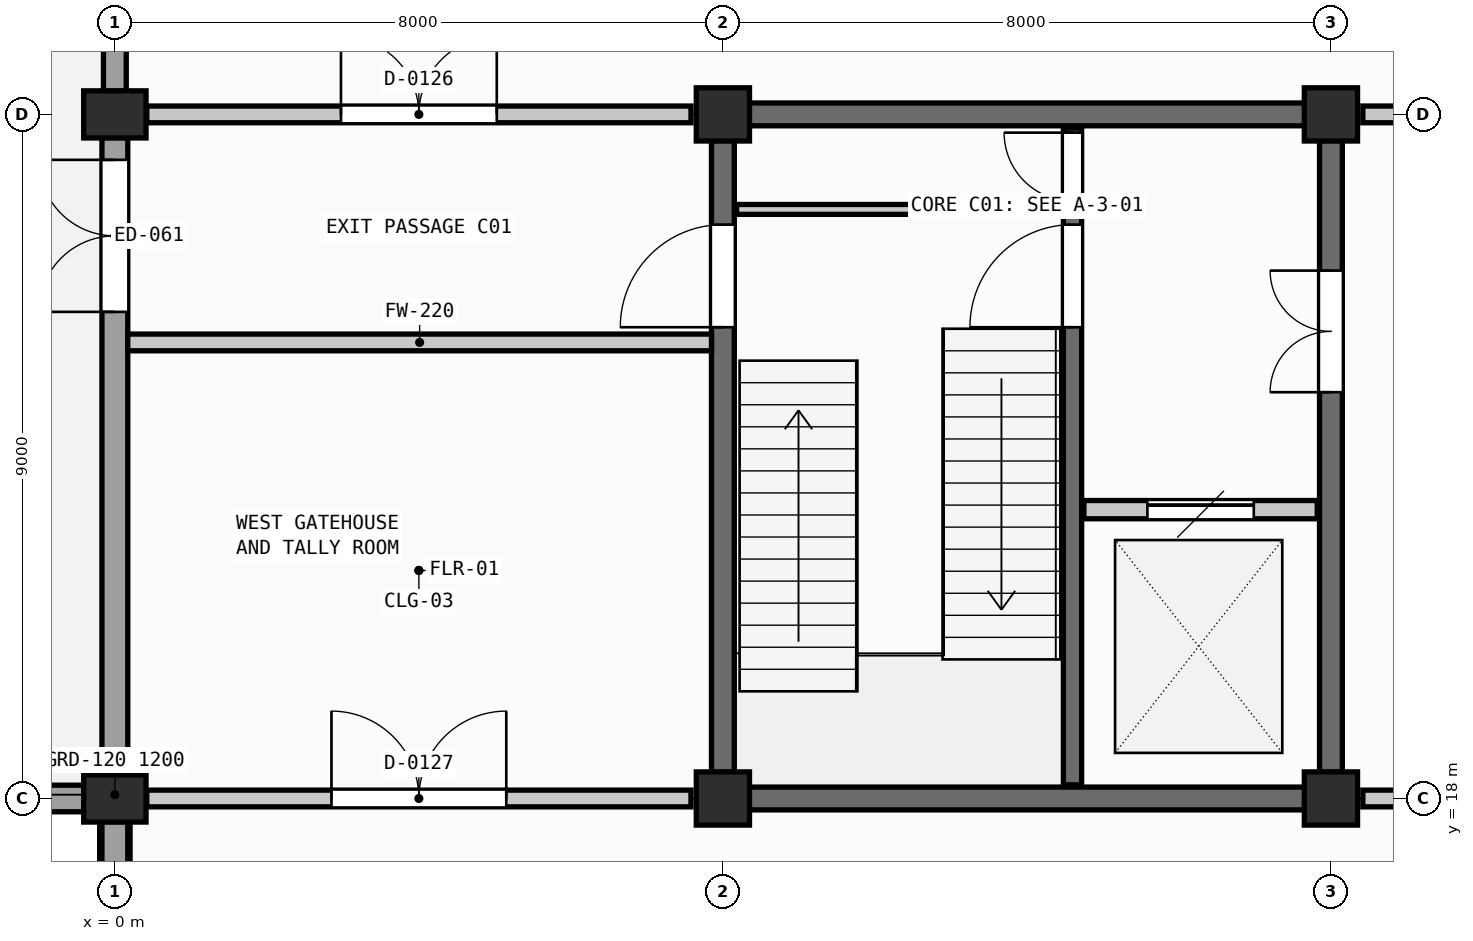
"""IFC4 building model, lengths in metres.
Left out: names, types, materials, properties, quantities, classifications, styles, units other than length and angle.
Written with IfcOpenShell. Run it as: python <this file> out.ifc"""

import sys

from ifc_helpers import new_model, si_unit, direction, frame, frame_2d, origin, origin_2d, place, context, subcontext, project, spatial, rectangle, extrude, element, fill, save


model = new_model("IFC4")
c1 = context("Model", 3, precision=1e-05, world=origin(), true_north=direction((0.0, 1.0)))
c2 = subcontext(c1, "Body", "Model", "MODEL_VIEW")
j1 = project(units=[si_unit("LENGTHUNIT", "METRE"), si_unit("PLANEANGLEUNIT", "RADIAN")], contexts=[c1])
p1 = place(None, origin())
s1 = spatial("IfcSite", under=j1, at=p1, CompositionType="ELEMENT")
p2 = place(p1, origin())
s2 = spatial("IfcBuilding", under=s1, at=p2, CompositionType="ELEMENT")
p3 = place(p2, origin())
s3 = spatial("IfcBuildingStorey", under=s2, at=p3, CompositionType="ELEMENT", Elevation=0.0)
p4 = place(p3, frame((0.0, 0.0, -1.25), z_axis=(0.0, 0.0, 1.0), x_axis=(0.0, 1.0, 0.0)))
e1 = element("IfcWall", 1, at=p4, inside=s3, PredefinedType="STANDARD", context=c2, shape_type="SweptSolid", body=[
    extrude(rectangle(XDim=18.0, YDim=0.4, at=frame_2d((9.0, 0.0))), origin(), (0.0, 0.0, 1.0), 0.9),
])
p5 = place(p3, frame((-3.2, 18.0, -1.25), z_axis=(0.0, 0.0, 1.0), x_axis=(1.0, 0.0, 0.0)))
e2 = element("IfcWall", 2, at=p5, inside=s3, PredefinedType="STANDARD", context=c2, shape_type="SweptSolid", body=[
    extrude(rectangle(XDim=3.2, YDim=0.35, at=frame_2d((1.6, 0.0))), origin(), (0.0, 0.0, 1.0), 0.97),
])
for number, where, z_axis, x_axis in (
    (3, (0.0, 18.0, -1.25), (0.0, 0.0, 1.0), (1.0, 0.0, 0.0)),
    (4, (0.0, 27.0, -1.25), (0.0, 0.0, 1.0), (1.0, 0.0, 0.0)),
):
    element("IfcColumn", number, at=place(p3, frame(where, z_axis=z_axis, x_axis=x_axis)), inside=s3, PredefinedType="COLUMN", context=c2, shape_type="SweptSolid", body=[
        extrude(rectangle(XDim=0.82, YDim=0.62, at=origin_2d()), origin(), (0.0, 0.0, 1.0), 6.05),
    ])
for number, where, z_axis, x_axis in (
    (5, (8.0, 18.0, -1.25), (0.0, 0.0, 1.0), (1.0, 0.0, 0.0)),
    (6, (8.0, 27.0, -1.25), (0.0, 0.0, 1.0), (1.0, 0.0, 0.0)),
    (7, (16.0, 18.0, -1.25), (0.0, 0.0, 1.0), (1.0, 0.0, 0.0)),
    (8, (16.0, 27.0, -1.25), (0.0, 0.0, 1.0), (1.0, 0.0, 0.0)),
):
    element("IfcColumn", number, at=place(p3, frame(where, z_axis=z_axis, x_axis=x_axis)), inside=s3, PredefinedType="COLUMN", context=c2, shape_type="SweptSolid", body=[
        extrude(rectangle(XDim=0.7, YDim=0.7, at=origin_2d()), origin(), (0.0, 0.0, 1.0), 6.05),
    ])
p6 = place(p3, frame((0.0, 17.695, 0.0), z_axis=(0.0, 0.0, 1.0), x_axis=(0.0, -1.0, 0.0)))
e9 = element("IfcWall", 9, at=p6, inside=s3, PredefinedType="SOLIDWALL", context=c2, shape_type="SweptSolid", body=[
    extrude(rectangle(XDim=8.39, YDim=0.34, at=frame_2d((4.195, 0.0))), origin(), (0.0, 0.0, 1.0), 3.65),
])
p7 = place(p3, frame((0.0, 26.695, 0.0), z_axis=(0.0, 0.0, 1.0), x_axis=(0.0, -1.0, 0.0)))
e10 = element("IfcWall", 10, at=p7, inside=s3, PredefinedType="SOLIDWALL", context=c2, shape_type="SweptSolid", body=[
    extrude(rectangle(XDim=8.39, YDim=0.34, at=frame_2d((4.195, 0.0))), origin(), (0.0, 0.0, 1.0), 3.65),
])
p8 = place(p7, frame((0.293, 0.0, 0.0)))
e11 = element("IfcOpeningElement", 11, at=p8, cuts=e10, PredefinedType="OPENING", context=c2, shape_type="SweptSolid", body=[
    extrude(rectangle(XDim=2.0, YDim=2.25, at=frame_2d((1.0, 1.125))), frame((0.0, 0.18, 0.0), z_axis=(0.0, -1.0, 0.0), x_axis=(1.0, 0.0, 0.0)), (0.0, 0.0, 1.0), 0.36),
])
p9 = place(p3, frame((0.0, 35.695, 0.0), z_axis=(0.0, 0.0, 1.0), x_axis=(0.0, -1.0, 0.0)))
e12 = element("IfcWall", 12, at=p9, inside=s3, PredefinedType="SOLIDWALL", context=c2, shape_type="SweptSolid", body=[
    extrude(rectangle(XDim=8.39, YDim=0.3, at=frame_2d((4.195, 0.0))), origin(), (0.0, 0.0, 1.0), 3.65),
])
p10 = place(p9, frame((2.995, 0.0, 0.0)))
e13 = element("IfcOpeningElement", 13, at=p10, cuts=e12, PredefinedType="OPENING", context=c2, shape_type="SweptSolid", body=[
    extrude(rectangle(XDim=2.4, YDim=2.3, at=frame_2d((1.2, 1.15))), frame((0.0, 0.16, 0.0), z_axis=(0.0, -1.0, 0.0), x_axis=(1.0, 0.0, 0.0)), (0.0, 0.0, 1.0), 0.32),
])
for number, where, z_axis, x_axis in (
    (14, (8.345, 18.0, -1.25), (0.0, 0.0, 1.0), (1.0, 0.0, 0.0)),
    (15, (8.345, 27.0, -1.25), (0.0, 0.0, 1.0), (1.0, 0.0, 0.0)),
):
    element("IfcWall", number, at=place(p3, frame(where, z_axis=z_axis, x_axis=x_axis)), inside=s3, PredefinedType="SHEAR", context=c2, shape_type="SweptSolid", body=[
        extrude(rectangle(XDim=7.31, YDim=0.3, at=frame_2d((3.655, 0.0))), origin(), (0.0, 0.0, 1.0), 5.755),
    ])
p11 = place(p3, frame((8.0, 18.345, -1.25), z_axis=(0.0, 0.0, 1.0), x_axis=(0.0, 1.0, 0.0)))
e16 = element("IfcWall", 16, at=p11, inside=s3, PredefinedType="SHEAR", context=c2, shape_type="SweptSolid", body=[
    extrude(rectangle(XDim=8.31, YDim=0.3, at=frame_2d((4.155, 0.0))), origin(), (0.0, 0.0, 1.0), 5.755),
])
p12 = place(p11, frame((5.855, 0.0, 1.25)))
e17 = element("IfcOpeningElement", 17, at=p12, cuts=e16, PredefinedType="OPENING", context=c2, shape_type="SweptSolid", body=[
    extrude(rectangle(XDim=1.35, YDim=2.2, at=frame_2d((0.675, 1.1))), frame((0.0, 0.16, 0.0), z_axis=(0.0, -1.0, 0.0), x_axis=(1.0, 0.0, 0.0)), (0.0, 0.0, 1.0), 0.32),
])
p13 = place(p3, frame((16.0, 18.345, -1.25), z_axis=(0.0, 0.0, 1.0), x_axis=(0.0, 1.0, 0.0)))
e18 = element("IfcWall", 18, at=p13, inside=s3, PredefinedType="SHEAR", context=c2, shape_type="SweptSolid", body=[
    extrude(rectangle(XDim=8.31, YDim=0.3, at=frame_2d((4.155, 0.0))), origin(), (0.0, 0.0, 1.0), 5.755),
])
p14 = place(p13, frame((5.0, 0.0, 1.25)))
e19 = element("IfcOpeningElement", 19, at=p14, cuts=e18, PredefinedType="OPENING", context=c2, shape_type="SweptSolid", body=[
    extrude(rectangle(XDim=1.6, YDim=2.2, at=frame_2d((0.8, 1.1))), frame((0.0, 0.16, 0.0), z_axis=(0.0, -1.0, 0.0), x_axis=(1.0, 0.0, 0.0)), (0.0, 0.0, 1.0), 0.32),
])
p15 = place(p3, frame((12.6, 18.18, -1.25), z_axis=(0.0, 0.0, 1.0), x_axis=(0.0, 1.0, 0.0)))
e20 = element("IfcWall", 20, at=p15, inside=s3, PredefinedType="SHEAR", context=c2, shape_type="SweptSolid", body=[
    extrude(rectangle(XDim=8.64, YDim=0.24, at=frame_2d((4.32, 0.0))), origin(), (0.0, 0.0, 1.0), 5.755),
])
p16 = place(p15, frame((6.02, 0.0, 1.25)))
e21 = element("IfcOpeningElement", 21, at=p16, cuts=e20, PredefinedType="OPENING", context=c2, shape_type="SweptSolid", body=[
    extrude(rectangle(XDim=1.35, YDim=2.2, at=frame_2d((0.675, 1.1))), frame((0.0, 0.13, 0.0), z_axis=(0.0, -1.0, 0.0), x_axis=(1.0, 0.0, 0.0)), (0.0, 0.0, 1.0), 0.26),
])
p17 = place(p15, frame((7.68, 0.0, 1.25)))
e22 = element("IfcOpeningElement", 22, at=p17, cuts=e20, PredefinedType="OPENING", context=c2, shape_type="SweptSolid", body=[
    extrude(rectangle(XDim=0.9, YDim=2.05, at=frame_2d((0.45, 1.025))), frame((0.0, 0.13, 0.0), z_axis=(0.0, -1.0, 0.0), x_axis=(1.0, 0.0, 0.0)), (0.0, 0.0, 1.0), 0.26),
])
p18 = place(p3, frame((8.18, 25.75, 0.0), z_axis=(0.0, 0.0, 1.0), x_axis=(1.0, 0.0, 0.0)))
e23 = element("IfcWall", 23, at=p18, inside=s3, PredefinedType="PARTITIONING", context=c2, shape_type="SweptSolid", body=[
    extrude(rectangle(XDim=4.28, YDim=0.13, at=frame_2d((2.14, 0.0))), origin(), (0.0, 0.0, 1.0), 3.855),
])
p19 = place(p3, frame((12.75, 21.8, 0.0), z_axis=(0.0, 0.0, 1.0), x_axis=(1.0, 0.0, 0.0)))
e24 = element("IfcWall", 24, at=p19, inside=s3, PredefinedType="SHEAR", context=c2, shape_type="SweptSolid", body=[
    extrude(rectangle(XDim=3.07, YDim=0.24, at=frame_2d((1.535, 0.0))), origin(), (0.0, 0.0, 1.0), 3.855),
])
p20 = place(p19, frame((0.835, 0.0, 0.0)))
e25 = element("IfcOpeningElement", 25, at=p20, cuts=e24, PredefinedType="OPENING", context=c2, shape_type="SweptSolid", body=[
    extrude(rectangle(XDim=1.4, YDim=2.3, at=frame_2d((0.7, 1.15))), frame((0.0, 0.13, 0.0), z_axis=(0.0, -1.0, 0.0), x_axis=(1.0, 0.0, 0.0)), (0.0, 0.0, 1.0), 0.26),
])
p21 = place(p3, frame((0.42, 27.0, 0.0), z_axis=(0.0, 0.0, 1.0), x_axis=(1.0, 0.0, 0.0)))
e26 = element("IfcWall", 26, at=p21, inside=s3, PredefinedType="SOLIDWALL", context=c2, shape_type="SweptSolid", body=[
    extrude(rectangle(XDim=7.16, YDim=0.22, at=frame_2d((3.58, 0.0))), origin(), (0.0, 0.0, 1.0), 3.55),
])
p22 = place(p21, frame((2.555, 0.0, 0.0)))
e27 = element("IfcOpeningElement", 27, at=p22, cuts=e26, PredefinedType="OPENING", context=c2, shape_type="SweptSolid", body=[
    extrude(rectangle(XDim=2.05, YDim=2.4, at=frame_2d((1.025, 1.2))), frame((0.0, 0.12, 0.0), z_axis=(0.0, -1.0, 0.0), x_axis=(1.0, 0.0, 0.0)), (0.0, 0.0, 1.0), 0.24),
])
p23 = place(p3, frame((0.42, 18.0, 0.0), z_axis=(0.0, 0.0, 1.0), x_axis=(1.0, 0.0, 0.0)))
e28 = element("IfcWall", 28, at=p23, inside=s3, PredefinedType="SOLIDWALL", context=c2, shape_type="SweptSolid", body=[
    extrude(rectangle(XDim=7.16, YDim=0.22, at=frame_2d((3.58, 0.0))), origin(), (0.0, 0.0, 1.0), 3.55),
])
p24 = place(p23, frame((2.43, 0.0, 0.0)))
e29 = element("IfcOpeningElement", 29, at=p24, cuts=e28, PredefinedType="OPENING", context=c2, shape_type="SweptSolid", body=[
    extrude(rectangle(XDim=2.3, YDim=2.5, at=frame_2d((1.15, 1.25))), frame((0.0, 0.12, 0.0), z_axis=(0.0, -1.0, 0.0), x_axis=(1.0, 0.0, 0.0)), (0.0, 0.0, 1.0), 0.24),
])
p25 = place(p3, frame((16.42, 27.0, 0.0), z_axis=(0.0, 0.0, 1.0), x_axis=(1.0, 0.0, 0.0)))
e30 = element("IfcWall", 30, at=p25, inside=s3, PredefinedType="SOLIDWALL", context=c2, shape_type="SweptSolid", body=[
    extrude(rectangle(XDim=7.16, YDim=0.22, at=frame_2d((3.58, 0.0))), origin(), (0.0, 0.0, 1.0), 3.55),
])
p26 = place(p25, frame((2.555, 0.0, 0.0)))
e31 = element("IfcOpeningElement", 31, at=p26, cuts=e30, PredefinedType="OPENING", context=c2, shape_type="SweptSolid", body=[
    extrude(rectangle(XDim=2.05, YDim=2.4, at=frame_2d((1.025, 1.2))), frame((0.0, 0.12, 0.0), z_axis=(0.0, -1.0, 0.0), x_axis=(1.0, 0.0, 0.0)), (0.0, 0.0, 1.0), 0.24),
])
p27 = place(p3, frame((16.42, 18.0, 0.0), z_axis=(0.0, 0.0, 1.0), x_axis=(1.0, 0.0, 0.0)))
e32 = element("IfcWall", 32, at=p27, inside=s3, PredefinedType="SOLIDWALL", context=c2, shape_type="SweptSolid", body=[
    extrude(rectangle(XDim=7.16, YDim=0.22, at=frame_2d((3.58, 0.0))), origin(), (0.0, 0.0, 1.0), 3.55),
])
p28 = place(p27, frame((2.43, 0.0, 0.0)))
e33 = element("IfcOpeningElement", 33, at=p28, cuts=e32, PredefinedType="OPENING", context=c2, shape_type="SweptSolid", body=[
    extrude(rectangle(XDim=2.3, YDim=2.5, at=frame_2d((1.15, 1.25))), frame((0.0, 0.12, 0.0), z_axis=(0.0, -1.0, 0.0), x_axis=(1.0, 0.0, 0.0)), (0.0, 0.0, 1.0), 0.24),
])
p29 = place(p3, frame((0.17, 24.0, 0.0), z_axis=(0.0, 0.0, 1.0), x_axis=(1.0, 0.0, 0.0)))
e34 = element("IfcWall", 34, at=p29, inside=s3, PredefinedType="SOLIDWALL", context=c2, shape_type="SweptSolid", body=[
    extrude(rectangle(XDim=7.68, YDim=0.22, at=frame_2d((3.84, 0.0))), origin(), (0.0, 0.0, 1.0), 3.65),
])
p30 = place(p16, origin())
e35 = element("IfcDoor", 35, at=p30, inside=s3, OperationType="SINGLE_SWING_LEFT", PredefinedType="DOOR", context=c2, shape_type="SweptSolid", body=[
    extrude(rectangle(XDim=1.35, YDim=2.2, at=frame_2d((0.675, 1.1))), frame((0.0, 0.025, 0.0), z_axis=(0.0, -1.0, 0.0), x_axis=(1.0, 0.0, 0.0)), (0.0, 0.0, 1.0), 0.05),
])
fill(e21, e35)
p31 = place(p17, origin())
e36 = element("IfcDoor", 36, at=p31, inside=s3, OperationType="SINGLE_SWING_RIGHT", PredefinedType="DOOR", context=c2, shape_type="SweptSolid", body=[
    extrude(rectangle(XDim=0.9, YDim=2.05, at=frame_2d((0.45, 1.025))), frame((0.0, 0.025, 0.0), z_axis=(0.0, -1.0, 0.0), x_axis=(1.0, 0.0, 0.0)), (0.0, 0.0, 1.0), 0.05),
])
fill(e22, e36)
p32 = place(p14, origin())
e37 = element("IfcDoor", 37, at=p32, inside=s3, OperationType="DOUBLE_DOOR_SINGLE_SWING", PredefinedType="DOOR", context=c2, shape_type="SweptSolid", body=[
    extrude(rectangle(XDim=1.6, YDim=2.2, at=frame_2d((0.8, 1.1))), frame((0.0, 0.025, 0.0), z_axis=(0.0, -1.0, 0.0), x_axis=(1.0, 0.0, 0.0)), (0.0, 0.0, 1.0), 0.05),
])
fill(e19, e37)
p33 = place(p20, origin())
e38 = element("IfcDoor", 38, at=p33, inside=s3, OperationType="SLIDING_TO_LEFT", PredefinedType="DOOR", context=c2, shape_type="SweptSolid", body=[
    extrude(rectangle(XDim=1.4, YDim=2.3, at=frame_2d((0.7, 1.15))), frame((0.0, 0.025, 0.0), z_axis=(0.0, -1.0, 0.0), x_axis=(1.0, 0.0, 0.0)), (0.0, 0.0, 1.0), 0.05),
])
fill(e25, e38)
p34 = place(p22, origin())
e39 = element("IfcDoor", 39, at=p34, inside=s3, OperationType="DOUBLE_DOOR_SINGLE_SWING", PredefinedType="DOOR", context=c2, shape_type="SweptSolid", body=[
    extrude(rectangle(XDim=2.05, YDim=2.4, at=frame_2d((1.025, 1.2))), frame((0.0, 0.025, 0.0), z_axis=(0.0, -1.0, 0.0), x_axis=(1.0, 0.0, 0.0)), (0.0, 0.0, 1.0), 0.05),
])
fill(e27, e39)
p35 = place(p24, origin())
e40 = element("IfcDoor", 40, at=p35, inside=s3, OperationType="DOUBLE_DOOR_SINGLE_SWING", PredefinedType="DOOR", context=c2, shape_type="SweptSolid", body=[
    extrude(rectangle(XDim=2.3, YDim=2.5, at=frame_2d((1.15, 1.25))), frame((0.0, 0.025, 0.0), z_axis=(0.0, -1.0, 0.0), x_axis=(1.0, 0.0, 0.0)), (0.0, 0.0, 1.0), 0.05),
])
fill(e29, e40)
p36 = place(p12, origin())
e41 = element("IfcDoor", 41, at=p36, inside=s3, OperationType="SINGLE_SWING_LEFT", PredefinedType="DOOR", context=c2, shape_type="SweptSolid", body=[
    extrude(rectangle(XDim=1.35, YDim=2.2, at=frame_2d((0.675, 1.1))), frame((0.0, 0.025, 0.0), z_axis=(0.0, -1.0, 0.0), x_axis=(1.0, 0.0, 0.0)), (0.0, 0.0, 1.0), 0.05),
])
fill(e17, e41)
p37 = place(p8, frame((2.0, 0.0, 0.0), z_axis=(0.0, 0.0, 1.0), x_axis=(-1.0, 0.0, 0.0)))
e42 = element("IfcDoor", 42, at=p37, inside=s3, OperationType="DOUBLE_DOOR_SINGLE_SWING", PredefinedType="DOOR", context=c2, shape_type="SweptSolid", body=[
    extrude(rectangle(XDim=2.0, YDim=2.25, at=frame_2d((1.0, 1.125))), frame((0.0, 0.025, 0.0), z_axis=(0.0, -1.0, 0.0), x_axis=(1.0, 0.0, 0.0)), (0.0, 0.0, 1.0), 0.05),
])
fill(e11, e42)
save(model, sys.argv[1])
